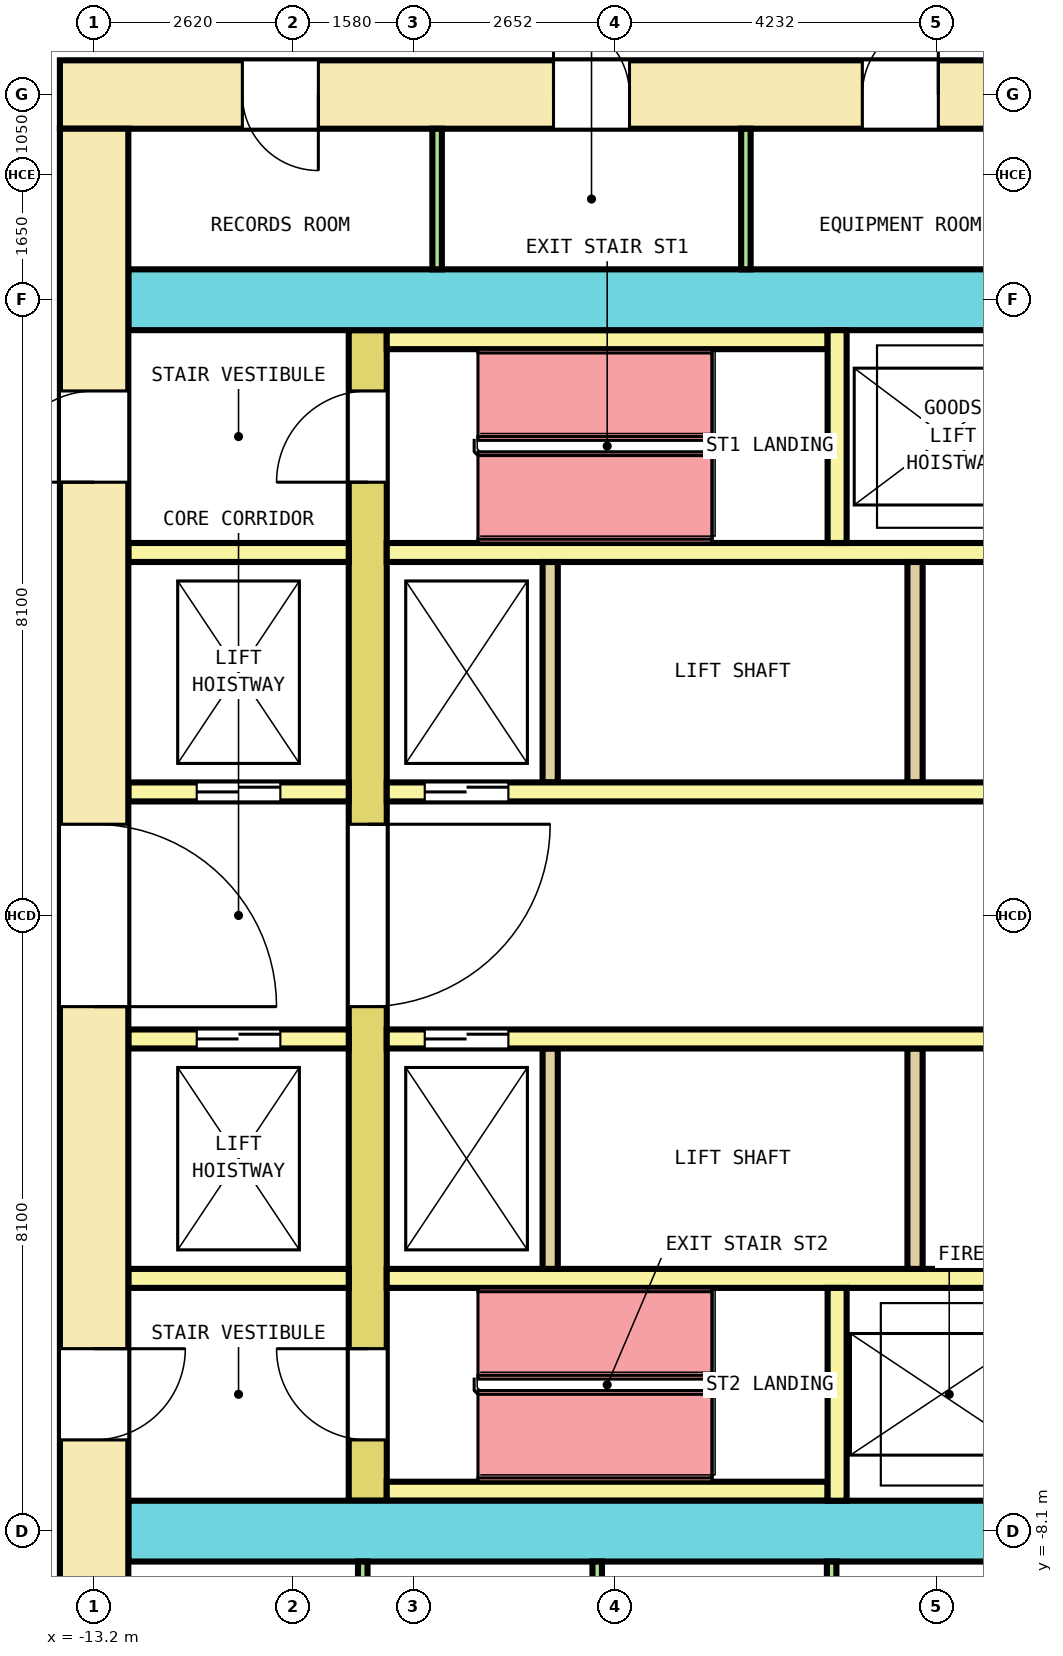
"""IFC4 building model, lengths in metres.
Left out: names, types, materials, properties, quantities, classifications, styles, units other than length and angle.
Written with IfcOpenShell. Run it as: python <this file> out.ifc"""

import sys

from ifc_helpers import new_model, si_unit, direction, frame, frame_2d, origin, place, context, subcontext, project, spatial, rectangle, extrude, element, fill, save


model = new_model("IFC4")
c1 = context("Model", 3, precision=1e-05, world=origin(), true_north=direction((0.0, 1.0)))
c2 = subcontext(c1, "Body", "Model", "MODEL_VIEW")
j1 = project(units=[si_unit("LENGTHUNIT", "METRE"), si_unit("PLANEANGLEUNIT", "RADIAN")], contexts=[c1])
p1 = place(None, origin())
s1 = spatial("IfcSite", under=j1, at=p1, CompositionType="ELEMENT")
p2 = place(p1, origin())
s2 = spatial("IfcBuilding", under=s1, at=p2, CompositionType="ELEMENT")
p3 = place(p2, frame((0.0, 0.0, 58.6)))
s3 = spatial("IfcBuildingStorey", under=s2, at=p3, CompositionType="ELEMENT", Elevation=58.6)
p4 = place(p3, frame((-13.65, 10.8, 0.0), z_axis=(0.0, 0.0, 1.0), x_axis=(1.0, 0.0, 0.0)))
e1 = element("IfcWall", 1, at=p4, inside=s3, PredefinedType="SHEAR", context=c2, shape_type="SweptSolid", body=[
    extrude(rectangle(XDim=27.3, YDim=0.9, at=frame_2d((13.65, 0.0))), origin(), (0.0, 0.0, 1.0), 4.1),
])
p5 = place(p4, frame((2.4, 0.0, 0.0)))
e2 = element("IfcOpeningElement", 2, at=p5, cuts=e1, PredefinedType="OPENING", context=c2, shape_type="SweptSolid", body=[
    extrude(rectangle(XDim=1.0, YDim=2.1, at=frame_2d((0.5, 1.05))), frame((0.0, 0.46, 0.0), z_axis=(0.0, -1.0, 0.0), x_axis=(1.0, 0.0, 0.0)), (0.0, 0.0, 1.0), 0.92),
])
p6 = place(p4, frame((6.494, 0.0, 0.0)))
e3 = element("IfcOpeningElement", 3, at=p6, cuts=e1, PredefinedType="OPENING", context=c2, shape_type="SweptSolid", body=[
    extrude(rectangle(XDim=1.0, YDim=2.1, at=frame_2d((0.5, 1.05))), frame((0.0, 0.46, 0.0), z_axis=(0.0, -1.0, 0.0), x_axis=(1.0, 0.0, 0.0)), (0.0, 0.0, 1.0), 0.92),
])
p7 = place(p4, frame((10.556, 0.0, 0.0)))
e4 = element("IfcOpeningElement", 4, at=p7, cuts=e1, PredefinedType="OPENING", context=c2, shape_type="SweptSolid", body=[
    extrude(rectangle(XDim=1.0, YDim=2.1, at=frame_2d((0.5, 1.05))), frame((0.0, 0.46, 0.0), z_axis=(0.0, -1.0, 0.0), x_axis=(1.0, 0.0, 0.0)), (0.0, 0.0, 1.0), 0.92),
])
p8 = place(p4, frame((18.077, 0.0, 0.0)))
e5 = element("IfcOpeningElement", 5, at=p8, cuts=e1, PredefinedType="OPENING", context=c2, shape_type="SweptSolid", body=[
    extrude(rectangle(XDim=1.0, YDim=2.1, at=frame_2d((0.5, 1.05))), frame((0.0, 0.46, 0.0), z_axis=(0.0, -1.0, 0.0), x_axis=(1.0, 0.0, 0.0)), (0.0, 0.0, 1.0), 0.92),
])
p9 = place(p4, frame((21.206, 0.0, 0.0)))
e6 = element("IfcOpeningElement", 6, at=p9, cuts=e1, PredefinedType="OPENING", context=c2, shape_type="SweptSolid", body=[
    extrude(rectangle(XDim=1.0, YDim=2.1, at=frame_2d((0.5, 1.05))), frame((0.0, 0.46, 0.0), z_axis=(0.0, -1.0, 0.0), x_axis=(1.0, 0.0, 0.0)), (0.0, 0.0, 1.0), 0.92),
])
p10 = place(p4, frame((24.367, 0.0, 0.0)))
e7 = element("IfcOpeningElement", 7, at=p10, cuts=e1, PredefinedType="OPENING", context=c2, shape_type="SweptSolid", body=[
    extrude(rectangle(XDim=1.0, YDim=2.1, at=frame_2d((0.5, 1.05))), frame((0.0, 0.46, 0.0), z_axis=(0.0, -1.0, 0.0), x_axis=(1.0, 0.0, 0.0)), (0.0, 0.0, 1.0), 0.92),
])
p11 = place(p4, frame((14.575, 0.0, 0.0)))
e8 = element("IfcOpeningElement", 8, at=p11, cuts=e1, PredefinedType="OPENING", context=c2, shape_type="SweptSolid", body=[
    extrude(rectangle(XDim=1.4, YDim=2.1, at=frame_2d((0.7, 1.05))), frame((0.0, 0.46, 0.0), z_axis=(0.0, -1.0, 0.0), x_axis=(1.0, 0.0, 0.0)), (0.0, 0.0, 1.0), 0.92),
])
p12 = place(p3, frame((-13.2, -10.35, 0.0), z_axis=(0.0, 0.0, 1.0), x_axis=(0.0, 1.0, 0.0)))
e9 = element("IfcWall", 9, at=p12, inside=s3, PredefinedType="SHEAR", context=c2, shape_type="SweptSolid", body=[
    extrude(rectangle(XDim=20.7, YDim=0.9, at=frame_2d((10.35, 0.0))), origin(), (0.0, 0.0, 1.0), 4.1),
])
p13 = place(p12, frame((9.15, 0.0, 0.0)))
e10 = element("IfcOpeningElement", 10, at=p13, cuts=e9, PredefinedType="OPENING", context=c2, shape_type="SweptSolid", body=[
    extrude(rectangle(XDim=2.4, YDim=2.1, at=frame_2d((1.2, 1.05))), frame((0.0, 0.46, 0.0), z_axis=(0.0, -1.0, 0.0), x_axis=(1.0, 0.0, 0.0)), (0.0, 0.0, 1.0), 0.92),
])
p14 = place(p12, frame((16.05, 0.0, 0.0)))
e11 = element("IfcOpeningElement", 11, at=p14, cuts=e9, PredefinedType="OPENING", context=c2, shape_type="SweptSolid", body=[
    extrude(rectangle(XDim=1.2, YDim=2.1, at=frame_2d((0.6, 1.05))), frame((0.0, 0.46, 0.0), z_axis=(0.0, -1.0, 0.0), x_axis=(1.0, 0.0, 0.0)), (0.0, 0.0, 1.0), 0.92),
])
p15 = place(p12, frame((3.45, 0.0, 0.0)))
e12 = element("IfcOpeningElement", 12, at=p15, cuts=e9, PredefinedType="OPENING", context=c2, shape_type="SweptSolid", body=[
    extrude(rectangle(XDim=1.2, YDim=2.1, at=frame_2d((0.6, 1.05))), frame((0.0, 0.46, 0.0), z_axis=(0.0, -1.0, 0.0), x_axis=(1.0, 0.0, 0.0)), (0.0, 0.0, 1.0), 0.92),
])
p16 = place(p3, frame((-12.75, 8.1, 0.0), z_axis=(0.0, 0.0, 1.0), x_axis=(1.0, 0.0, 0.0)))
e13 = element("IfcWall", 13, at=p16, inside=s3, PredefinedType="SHEAR", context=c2, shape_type="SweptSolid", body=[
    extrude(rectangle(XDim=25.5, YDim=0.8, at=frame_2d((12.75, 0.0))), origin(), (0.0, 0.0, 1.0), 4.1),
])
p17 = place(p16, frame((13.675, 0.0, 0.0)))
e14 = element("IfcOpeningElement", 14, at=p17, cuts=e13, PredefinedType="OPENING", context=c2, shape_type="SweptSolid", body=[
    extrude(rectangle(XDim=1.4, YDim=2.1, at=frame_2d((0.7, 1.05))), frame((0.0, 0.41, 0.0), z_axis=(0.0, -1.0, 0.0), x_axis=(1.0, 0.0, 0.0)), (0.0, 0.0, 1.0), 0.82),
])
p18 = place(p3, frame((-12.75, -8.1, 0.0), z_axis=(0.0, 0.0, 1.0), x_axis=(1.0, 0.0, 0.0)))
e15 = element("IfcWall", 15, at=p18, inside=s3, PredefinedType="SHEAR", context=c2, shape_type="SweptSolid", body=[
    extrude(rectangle(XDim=25.5, YDim=0.8, at=frame_2d((12.75, 0.0))), origin(), (0.0, 0.0, 1.0), 4.1),
])
p19 = place(p18, frame((14.3, 0.0, 0.0)))
e16 = element("IfcOpeningElement", 16, at=p19, cuts=e15, PredefinedType="OPENING", context=c2, shape_type="SweptSolid", body=[
    extrude(rectangle(XDim=1.2, YDim=2.1, at=frame_2d((0.6, 1.05))), frame((0.0, 0.41, 0.0), z_axis=(0.0, -1.0, 0.0), x_axis=(1.0, 0.0, 0.0)), (0.0, 0.0, 1.0), 0.82),
])
p20 = place(p3, frame((-9.6, -7.7, 0.0), z_axis=(0.0, 0.0, 1.0), x_axis=(0.0, 1.0, 0.0)))
e17 = element("IfcWall", 17, at=p20, inside=s3, PredefinedType="SHEAR", context=c2, shape_type="SweptSolid", body=[
    extrude(rectangle(XDim=15.4, YDim=0.5, at=frame_2d((7.7, 0.0))), origin(), (0.0, 0.0, 1.0), 4.1),
])
p21 = place(p20, frame((6.5, 0.0, 0.0)))
e18 = element("IfcOpeningElement", 18, at=p21, cuts=e17, PredefinedType="OPENING", context=c2, shape_type="SweptSolid", body=[
    extrude(rectangle(XDim=2.4, YDim=2.1, at=frame_2d((1.2, 1.05))), frame((0.0, 0.26, 0.0), z_axis=(0.0, -1.0, 0.0), x_axis=(1.0, 0.0, 0.0)), (0.0, 0.0, 1.0), 0.52),
])
p22 = place(p20, frame((13.4, 0.0, 0.0)))
e19 = element("IfcOpeningElement", 19, at=p22, cuts=e17, PredefinedType="OPENING", context=c2, shape_type="SweptSolid", body=[
    extrude(rectangle(XDim=1.2, YDim=2.1, at=frame_2d((0.6, 1.05))), frame((0.0, 0.26, 0.0), z_axis=(0.0, -1.0, 0.0), x_axis=(1.0, 0.0, 0.0)), (0.0, 0.0, 1.0), 0.52),
])
p23 = place(p20, frame((0.8, 0.0, 0.0)))
e20 = element("IfcOpeningElement", 20, at=p23, cuts=e17, PredefinedType="OPENING", context=c2, shape_type="SweptSolid", body=[
    extrude(rectangle(XDim=1.2, YDim=2.1, at=frame_2d((0.6, 1.05))), frame((0.0, 0.26, 0.0), z_axis=(0.0, -1.0, 0.0), x_axis=(1.0, 0.0, 0.0)), (0.0, 0.0, 1.0), 0.52),
])
p24 = place(p3, frame((-12.75, 1.625, 0.0), z_axis=(0.0, 0.0, 1.0), x_axis=(1.0, 0.0, 0.0)))
e21 = element("IfcWall", 21, at=p24, inside=s3, PredefinedType="SOLIDWALL", context=c2, shape_type="SweptSolid", body=[
    extrude(rectangle(XDim=2.9, YDim=0.25, at=frame_2d((1.45, 0.0))), origin(), (0.0, 0.0, 1.0), 4.1),
])
p25 = place(p24, frame((0.9, 0.0, 0.0)))
e22 = element("IfcOpeningElement", 22, at=p25, cuts=e21, PredefinedType="OPENING", context=c2, shape_type="SweptSolid", body=[
    extrude(rectangle(XDim=1.1, YDim=2.1, at=frame_2d((0.55, 1.05))), frame((0.0, 0.135, 0.0), z_axis=(0.0, -1.0, 0.0), x_axis=(1.0, 0.0, 0.0)), (0.0, 0.0, 1.0), 0.27),
])
p26 = place(p3, frame((-9.35, 1.625, 0.0), z_axis=(0.0, 0.0, 1.0), x_axis=(1.0, 0.0, 0.0)))
e23 = element("IfcWall", 23, at=p26, inside=s3, PredefinedType="SOLIDWALL", context=c2, shape_type="SweptSolid", body=[
    extrude(rectangle(XDim=18.7, YDim=0.25, at=frame_2d((9.35, 0.0))), origin(), (0.0, 0.0, 1.0), 4.1),
])
p27 = place(p26, frame((0.5, 0.0, 0.0)))
e24 = element("IfcOpeningElement", 24, at=p27, cuts=e23, PredefinedType="OPENING", context=c2, shape_type="SweptSolid", body=[
    extrude(rectangle(XDim=1.1, YDim=2.1, at=frame_2d((0.55, 1.05))), frame((0.0, 0.135, 0.0), z_axis=(0.0, -1.0, 0.0), x_axis=(1.0, 0.0, 0.0)), (0.0, 0.0, 1.0), 0.27),
])
p28 = place(p26, frame((17.1, 0.0, 0.0)))
e25 = element("IfcOpeningElement", 25, at=p28, cuts=e23, PredefinedType="OPENING", context=c2, shape_type="SweptSolid", body=[
    extrude(rectangle(XDim=1.1, YDim=2.1, at=frame_2d((0.55, 1.05))), frame((0.0, 0.135, 0.0), z_axis=(0.0, -1.0, 0.0), x_axis=(1.0, 0.0, 0.0)), (0.0, 0.0, 1.0), 0.27),
])
p29 = place(p3, frame((-12.75, 4.775, 0.0), z_axis=(0.0, 0.0, 1.0), x_axis=(1.0, 0.0, 0.0)))
e26 = element("IfcWall", 26, at=p29, inside=s3, PredefinedType="SOLIDWALL", context=c2, shape_type="SweptSolid", body=[
    extrude(rectangle(XDim=2.9, YDim=0.25, at=frame_2d((1.45, 0.0))), origin(), (0.0, 0.0, 1.0), 4.1),
])
p30 = place(p3, frame((-9.35, 4.775, 0.0), z_axis=(0.0, 0.0, 1.0), x_axis=(1.0, 0.0, 0.0)))
e27 = element("IfcWall", 27, at=p30, inside=s3, PredefinedType="SOLIDWALL", context=c2, shape_type="SweptSolid", body=[
    extrude(rectangle(XDim=18.7, YDim=0.25, at=frame_2d((9.35, 0.0))), origin(), (0.0, 0.0, 1.0), 4.1),
])
for number, where, z_axis, x_axis in (
    (28, (-7.2, 1.75, 0.0), (0.0, 0.0, 1.0), (0.0, 1.0, 0.0)),
    (29, (-2.4, 1.75, 0.0), (0.0, 0.0, 1.0), (0.0, 1.0, 0.0)),
):
    element("IfcWall", number, at=place(p3, frame(where, z_axis=z_axis, x_axis=x_axis)), inside=s3, PredefinedType="SOLIDWALL", context=c2, shape_type="SweptSolid", body=[
        extrude(rectangle(XDim=2.9, YDim=0.2, at=frame_2d((1.45, 0.0))), origin(), (0.0, 0.0, 1.0), 4.1),
    ])
p31 = place(p3, frame((-12.75, -1.625, 0.0), z_axis=(0.0, 0.0, 1.0), x_axis=(1.0, 0.0, 0.0)))
e30 = element("IfcWall", 30, at=p31, inside=s3, PredefinedType="SOLIDWALL", context=c2, shape_type="SweptSolid", body=[
    extrude(rectangle(XDim=2.9, YDim=0.25, at=frame_2d((1.45, 0.0))), origin(), (0.0, 0.0, 1.0), 4.1),
])
p32 = place(p31, frame((0.9, 0.0, 0.0)))
e31 = element("IfcOpeningElement", 31, at=p32, cuts=e30, PredefinedType="OPENING", context=c2, shape_type="SweptSolid", body=[
    extrude(rectangle(XDim=1.1, YDim=2.1, at=frame_2d((0.55, 1.05))), frame((0.0, 0.135, 0.0), z_axis=(0.0, -1.0, 0.0), x_axis=(1.0, 0.0, 0.0)), (0.0, 0.0, 1.0), 0.27),
])
p33 = place(p3, frame((-9.35, -1.625, 0.0), z_axis=(0.0, 0.0, 1.0), x_axis=(1.0, 0.0, 0.0)))
e32 = element("IfcWall", 32, at=p33, inside=s3, PredefinedType="SOLIDWALL", context=c2, shape_type="SweptSolid", body=[
    extrude(rectangle(XDim=18.7, YDim=0.25, at=frame_2d((9.35, 0.0))), origin(), (0.0, 0.0, 1.0), 4.1),
])
p34 = place(p33, frame((0.5, 0.0, 0.0)))
e33 = element("IfcOpeningElement", 33, at=p34, cuts=e32, PredefinedType="OPENING", context=c2, shape_type="SweptSolid", body=[
    extrude(rectangle(XDim=1.1, YDim=2.1, at=frame_2d((0.55, 1.05))), frame((0.0, 0.135, 0.0), z_axis=(0.0, -1.0, 0.0), x_axis=(1.0, 0.0, 0.0)), (0.0, 0.0, 1.0), 0.27),
])
p35 = place(p33, frame((17.1, 0.0, 0.0)))
e34 = element("IfcOpeningElement", 34, at=p35, cuts=e32, PredefinedType="OPENING", context=c2, shape_type="SweptSolid", body=[
    extrude(rectangle(XDim=1.1, YDim=2.1, at=frame_2d((0.55, 1.05))), frame((0.0, 0.135, 0.0), z_axis=(0.0, -1.0, 0.0), x_axis=(1.0, 0.0, 0.0)), (0.0, 0.0, 1.0), 0.27),
])
p36 = place(p3, frame((-12.75, -4.775, 0.0), z_axis=(0.0, 0.0, 1.0), x_axis=(1.0, 0.0, 0.0)))
e35 = element("IfcWall", 35, at=p36, inside=s3, PredefinedType="SOLIDWALL", context=c2, shape_type="SweptSolid", body=[
    extrude(rectangle(XDim=2.9, YDim=0.25, at=frame_2d((1.45, 0.0))), origin(), (0.0, 0.0, 1.0), 4.1),
])
p37 = place(p3, frame((-9.35, -4.775, 0.0), z_axis=(0.0, 0.0, 1.0), x_axis=(1.0, 0.0, 0.0)))
e36 = element("IfcWall", 36, at=p37, inside=s3, PredefinedType="SOLIDWALL", context=c2, shape_type="SweptSolid", body=[
    extrude(rectangle(XDim=18.7, YDim=0.25, at=frame_2d((9.35, 0.0))), origin(), (0.0, 0.0, 1.0), 4.1),
])
for number, where, z_axis, x_axis in (
    (37, (-7.2, -4.65, 0.0), (0.0, 0.0, 1.0), (0.0, 1.0, 0.0)),
    (38, (-2.4, -4.65, 0.0), (0.0, 0.0, 1.0), (0.0, 1.0, 0.0)),
):
    element("IfcWall", number, at=place(p3, frame(where, z_axis=z_axis, x_axis=x_axis)), inside=s3, PredefinedType="SOLIDWALL", context=c2, shape_type="SweptSolid", body=[
        extrude(rectangle(XDim=2.9, YDim=0.2, at=frame_2d((1.45, 0.0))), origin(), (0.0, 0.0, 1.0), 4.1),
    ])
p38 = place(p3, frame((-9.35, 7.575, 0.0), z_axis=(0.0, 0.0, 1.0), x_axis=(1.0, 0.0, 0.0)))
e39 = element("IfcWall", 39, at=p38, inside=s3, PredefinedType="SOLIDWALL", context=c2, shape_type="SweptSolid", body=[
    extrude(rectangle(XDim=5.8, YDim=0.25, at=frame_2d((2.9, 0.0))), origin(), (0.0, 0.0, 1.0), 4.1),
])
p39 = place(p3, frame((-3.425, 4.9, 0.0), z_axis=(0.0, 0.0, 1.0), x_axis=(0.0, 1.0, 0.0)))
e40 = element("IfcWall", 40, at=p39, inside=s3, PredefinedType="SOLIDWALL", context=c2, shape_type="SweptSolid", body=[
    extrude(rectangle(XDim=2.8, YDim=0.25, at=frame_2d((1.4, 0.0))), origin(), (0.0, 0.0, 1.0), 4.1),
])
p40 = place(p3, frame((-9.35, -7.575, 0.0), z_axis=(0.0, 0.0, 1.0), x_axis=(1.0, 0.0, 0.0)))
e41 = element("IfcWall", 41, at=p40, inside=s3, PredefinedType="SOLIDWALL", context=c2, shape_type="SweptSolid", body=[
    extrude(rectangle(XDim=5.8, YDim=0.25, at=frame_2d((2.9, 0.0))), origin(), (0.0, 0.0, 1.0), 4.1),
])
p41 = place(p3, frame((-3.425, -7.7, 0.0), z_axis=(0.0, 0.0, 1.0), x_axis=(0.0, 1.0, 0.0)))
e42 = element("IfcWall", 42, at=p41, inside=s3, PredefinedType="SOLIDWALL", context=c2, shape_type="SweptSolid", body=[
    extrude(rectangle(XDim=2.8, YDim=0.25, at=frame_2d((1.4, 0.0))), origin(), (0.0, 0.0, 1.0), 4.1),
])
for number, where, z_axis, x_axis in (
    (43, (-8.688, 8.5, 0.0), (0.0, 0.0, 1.0), (0.0, 1.0, 0.0)),
    (44, (-4.625, 8.5, 0.0), (0.0, 0.0, 1.0), (0.0, 1.0, 0.0)),
    (45, (-9.666, -10.35, 0.0), (0.0, 0.0, 1.0), (0.0, 1.0, 0.0)),
    (46, (-6.581, -10.35, 0.0), (0.0, 0.0, 1.0), (0.0, 1.0, 0.0)),
    (47, (-3.497, -10.35, 0.0), (0.0, 0.0, 1.0), (0.0, 1.0, 0.0)),
):
    element("IfcWall", number, at=place(p3, frame(where, z_axis=z_axis, x_axis=x_axis)), inside=s3, PredefinedType="PARTITIONING", context=c2, shape_type="SweptSolid", body=[
        extrude(rectangle(XDim=1.85, YDim=0.125, at=frame_2d((0.925, 0.0))), origin(), (0.0, 0.0, 1.0), 4.1),
    ])
p42 = place(p25, origin())
e48 = element("IfcDoor", 48, at=p42, inside=s3, OperationType="DOUBLE_DOOR_SLIDING", PredefinedType="DOOR", context=c2, shape_type="SweptSolid", body=[
    extrude(rectangle(XDim=1.1, YDim=2.1, at=frame_2d((0.55, 1.05))), frame((0.0, 0.075, 0.0), z_axis=(0.0, -1.0, 0.0), x_axis=(1.0, 0.0, 0.0)), (0.0, 0.0, 1.0), 0.15),
])
fill(e22, e48)
p43 = place(p27, origin())
e49 = element("IfcDoor", 49, at=p43, inside=s3, OperationType="DOUBLE_DOOR_SLIDING", PredefinedType="DOOR", context=c2, shape_type="SweptSolid", body=[
    extrude(rectangle(XDim=1.1, YDim=2.1, at=frame_2d((0.55, 1.05))), frame((0.0, 0.075, 0.0), z_axis=(0.0, -1.0, 0.0), x_axis=(1.0, 0.0, 0.0)), (0.0, 0.0, 1.0), 0.15),
])
fill(e24, e49)
p44 = place(p32, origin())
e50 = element("IfcDoor", 50, at=p44, inside=s3, OperationType="DOUBLE_DOOR_SLIDING", PredefinedType="DOOR", context=c2, shape_type="SweptSolid", body=[
    extrude(rectangle(XDim=1.1, YDim=2.1, at=frame_2d((0.55, 1.05))), frame((0.0, 0.075, 0.0), z_axis=(0.0, -1.0, 0.0), x_axis=(1.0, 0.0, 0.0)), (0.0, 0.0, 1.0), 0.15),
])
fill(e31, e50)
p45 = place(p34, origin())
e51 = element("IfcDoor", 51, at=p45, inside=s3, OperationType="DOUBLE_DOOR_SLIDING", PredefinedType="DOOR", context=c2, shape_type="SweptSolid", body=[
    extrude(rectangle(XDim=1.1, YDim=2.1, at=frame_2d((0.55, 1.05))), frame((0.0, 0.075, 0.0), z_axis=(0.0, -1.0, 0.0), x_axis=(1.0, 0.0, 0.0)), (0.0, 0.0, 1.0), 0.15),
])
fill(e33, e51)
p46 = place(p21, origin())
e52 = element("IfcDoor", 52, at=p46, inside=s3, OperationType="DOUBLE_DOOR_SINGLE_SWING", PredefinedType="DOOR", context=c2, shape_type="SweptSolid", body=[
    extrude(rectangle(XDim=2.4, YDim=2.1, at=frame_2d((1.2, 1.05))), frame((0.0, 0.2, 0.0), z_axis=(0.0, -1.0, 0.0), x_axis=(1.0, 0.0, 0.0)), (0.0, 0.0, 1.0), 0.4),
])
fill(e18, e52)
p47 = place(p13, origin())
e53 = element("IfcDoor", 53, at=p47, inside=s3, OperationType="DOUBLE_DOOR_SINGLE_SWING", PredefinedType="DOOR", context=c2, shape_type="SweptSolid", body=[
    extrude(rectangle(XDim=2.4, YDim=2.1, at=frame_2d((1.2, 1.05))), frame((0.0, 0.3, 0.0), z_axis=(0.0, -1.0, 0.0), x_axis=(1.0, 0.0, 0.0)), (0.0, 0.0, 1.0), 0.6),
])
fill(e10, e53)
p48 = place(p22, origin())
e54 = element("IfcDoor", 54, at=p48, inside=s3, OperationType="SINGLE_SWING_LEFT", PredefinedType="DOOR", context=c2, shape_type="SweptSolid", body=[
    extrude(rectangle(XDim=1.2, YDim=2.1, at=frame_2d((0.6, 1.05))), frame((0.0, 0.2, 0.0), z_axis=(0.0, -1.0, 0.0), x_axis=(1.0, 0.0, 0.0)), (0.0, 0.0, 1.0), 0.4),
])
fill(e19, e54)
p49 = place(p14, origin())
e55 = element("IfcDoor", 55, at=p49, inside=s3, OperationType="SINGLE_SWING_RIGHT", PredefinedType="DOOR", context=c2, shape_type="SweptSolid", body=[
    extrude(rectangle(XDim=1.2, YDim=2.1, at=frame_2d((0.6, 1.05))), frame((0.0, 0.3, 0.0), z_axis=(0.0, -1.0, 0.0), x_axis=(1.0, 0.0, 0.0)), (0.0, 0.0, 1.0), 0.6),
])
fill(e11, e55)
p50 = place(p23, origin())
e56 = element("IfcDoor", 56, at=p50, inside=s3, OperationType="SINGLE_SWING_LEFT", PredefinedType="DOOR", context=c2, shape_type="SweptSolid", body=[
    extrude(rectangle(XDim=1.2, YDim=2.1, at=frame_2d((0.6, 1.05))), frame((0.0, 0.2, 0.0), z_axis=(0.0, -1.0, 0.0), x_axis=(1.0, 0.0, 0.0)), (0.0, 0.0, 1.0), 0.4),
])
fill(e20, e56)
p51 = place(p15, origin())
e57 = element("IfcDoor", 57, at=p51, inside=s3, OperationType="SINGLE_SWING_RIGHT", PredefinedType="DOOR", context=c2, shape_type="SweptSolid", body=[
    extrude(rectangle(XDim=1.2, YDim=2.1, at=frame_2d((0.6, 1.05))), frame((0.0, 0.3, 0.0), z_axis=(0.0, -1.0, 0.0), x_axis=(1.0, 0.0, 0.0)), (0.0, 0.0, 1.0), 0.6),
])
fill(e12, e57)
p52 = place(p5, origin())
e58 = element("IfcDoor", 58, at=p52, inside=s3, OperationType="SINGLE_SWING_RIGHT", PredefinedType="DOOR", context=c2, shape_type="SweptSolid", body=[
    extrude(rectangle(XDim=1.0, YDim=2.1, at=frame_2d((0.5, 1.05))), frame((0.0, 0.3, 0.0), z_axis=(0.0, -1.0, 0.0), x_axis=(1.0, 0.0, 0.0)), (0.0, 0.0, 1.0), 0.6),
])
fill(e2, e58)
p53 = place(p6, origin())
e59 = element("IfcDoor", 59, at=p53, inside=s3, OperationType="SINGLE_SWING_LEFT", PredefinedType="DOOR", context=c2, shape_type="SweptSolid", body=[
    extrude(rectangle(XDim=1.0, YDim=2.1, at=frame_2d((0.5, 1.05))), frame((0.0, 0.3, 0.0), z_axis=(0.0, -1.0, 0.0), x_axis=(1.0, 0.0, 0.0)), (0.0, 0.0, 1.0), 0.6),
])
fill(e3, e59)
p54 = place(p7, origin())
e60 = element("IfcDoor", 60, at=p54, inside=s3, OperationType="SINGLE_SWING_RIGHT", PredefinedType="DOOR", context=c2, shape_type="SweptSolid", body=[
    extrude(rectangle(XDim=1.0, YDim=2.1, at=frame_2d((0.5, 1.05))), frame((0.0, 0.3, 0.0), z_axis=(0.0, -1.0, 0.0), x_axis=(1.0, 0.0, 0.0)), (0.0, 0.0, 1.0), 0.6),
])
fill(e4, e60)
save(model, sys.argv[1])
